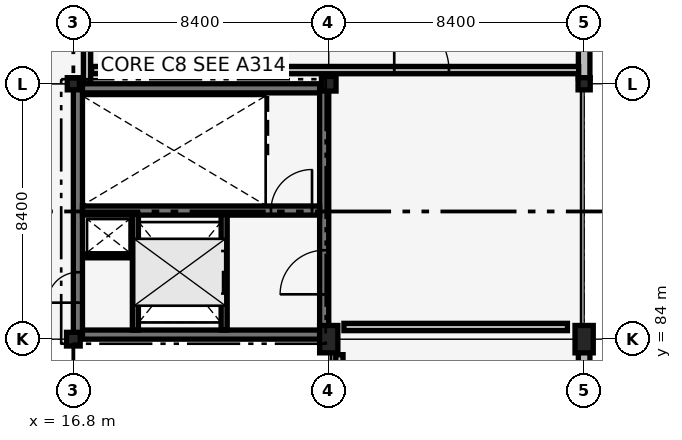
"""IFC4 building model, lengths in metres.
Left out: names, types, materials, properties, quantities, classifications, styles, units other than length and angle.
Written with IfcOpenShell. Run it as: python <this file> out.ifc"""

import sys

from ifc_helpers import new_model, si_unit, direction, frame, frame_2d, origin, origin_2d, place, context, subcontext, project, spatial, rectangle, extrude, element, fill, save


model = new_model("IFC4")
c1 = context("Model", 3, precision=1e-05, world=origin(), true_north=direction((0.0, 1.0)))
c2 = subcontext(c1, "Body", "Model", "MODEL_VIEW")
j1 = project(units=[si_unit("LENGTHUNIT", "METRE"), si_unit("PLANEANGLEUNIT", "RADIAN")], contexts=[c1])
p1 = place(None, origin())
s1 = spatial("IfcSite", under=j1, at=p1, CompositionType="ELEMENT")
p2 = place(p1, origin())
s2 = spatial("IfcBuilding", under=s1, at=p2, CompositionType="ELEMENT")
p3 = place(p2, frame((0.0, 0.0, 5.44)))
s3 = spatial("IfcBuildingStorey", under=s2, at=p3, CompositionType="ELEMENT", Elevation=5.44)
for number, where, z_axis, x_axis in (
    (1, (16.95, 84.15, 0.0), (0.0, 0.0, 1.0), (1.0, 0.0, 0.0)),
    (2, (16.95, 92.25, 0.0), (0.0, 0.0, 1.0), (1.0, 0.0, 0.0)),
):
    element("IfcWall", number, at=place(p3, frame(where, z_axis=z_axis, x_axis=x_axis)), inside=s3, PredefinedType="SHEAR", context=c2, shape_type="SweptSolid", body=[
        extrude(rectangle(XDim=8.1, YDim=0.3, at=frame_2d((4.05, 0.0))), origin(), (0.0, 0.0, 1.0), 4.12),
    ])
p4 = place(p3, frame((16.95, 84.15, 0.0), z_axis=(0.0, 0.0, 1.0), x_axis=(0.0, 1.0, 0.0)))
e3 = element("IfcWall", 3, at=p4, inside=s3, PredefinedType="SHEAR", context=c2, shape_type="SweptSolid", body=[
    extrude(rectangle(XDim=8.1, YDim=0.3, at=frame_2d((4.05, 0.0))), origin(), (0.0, 0.0, 1.0), 4.12),
])
p5 = place(p4, frame((1.05, 0.0, 0.0)))
e4 = element("IfcOpeningElement", 4, at=p5, cuts=e3, PredefinedType="OPENING", context=c2, shape_type="SweptSolid", body=[
    extrude(rectangle(XDim=1.0, YDim=2.15, at=frame_2d((0.5, 1.075))), frame((0.0, 0.16, 0.0), z_axis=(0.0, -1.0, 0.0), x_axis=(1.0, 0.0, 0.0)), (0.0, 0.0, 1.0), 0.32),
])
p6 = place(p3, frame((25.05, 84.15, 0.0), z_axis=(0.0, 0.0, 1.0), x_axis=(0.0, 1.0, 0.0)))
e5 = element("IfcWall", 5, at=p6, inside=s3, PredefinedType="SHEAR", context=c2, shape_type="SweptSolid", body=[
    extrude(rectangle(XDim=8.1, YDim=0.3, at=frame_2d((4.05, 0.0))), origin(), (0.0, 0.0, 1.0), 4.12),
])
p7 = place(p6, frame((1.325, 0.0, 0.0)))
e6 = element("IfcOpeningElement", 6, at=p7, cuts=e5, PredefinedType="OPENING", context=c2, shape_type="SweptSolid", body=[
    extrude(rectangle(XDim=1.45, YDim=2.15, at=frame_2d((0.725, 1.075))), frame((0.0, 0.16, 0.0), z_axis=(0.0, -1.0, 0.0), x_axis=(1.0, 0.0, 0.0)), (0.0, 0.0, 1.0), 0.32),
])
p8 = place(p3, frame((17.1, 88.23, 0.0), z_axis=(0.0, 0.0, 1.0), x_axis=(1.0, 0.0, 0.0)))
e7 = element("IfcWall", 7, at=p8, inside=s3, PredefinedType="SHEAR", context=c2, shape_type="SweptSolid", body=[
    extrude(rectangle(XDim=7.8, YDim=0.3, at=frame_2d((3.9, 0.0))), origin(), (0.0, 0.0, 1.0), 4.12),
])
p9 = place(p8, frame((6.2, 0.0, 0.0)))
e8 = element("IfcOpeningElement", 8, at=p9, cuts=e7, PredefinedType="OPENING", context=c2, shape_type="SweptSolid", body=[
    extrude(rectangle(XDim=1.35, YDim=2.15, at=frame_2d((0.675, 1.075))), frame((0.0, 0.16, 0.0), z_axis=(0.0, -1.0, 0.0), x_axis=(1.0, 0.0, 0.0)), (0.0, 0.0, 1.0), 0.32),
])
p10 = place(p3, frame((16.8, 84.0, 0.0), z_axis=(0.0, 0.0, 1.0), x_axis=(1.0, 0.0, 0.0)))
e9 = element("IfcColumn", 9, at=p10, inside=s3, PredefinedType="COLUMN", context=c2, shape_type="SweptSolid", body=[
    extrude(rectangle(XDim=0.45, YDim=0.45, at=origin_2d()), origin(), (0.0, 0.0, 1.0), 4.12),
])
p11 = place(p3, frame((16.8, 92.4, 0.0), z_axis=(0.0, 0.0, 1.0), x_axis=(1.0, 0.0, 0.0)))
e10 = element("IfcColumn", 10, at=p11, inside=s3, PredefinedType="COLUMN", context=c2, shape_type="SweptSolid", body=[
    extrude(rectangle(XDim=0.4, YDim=0.4, at=origin_2d()), origin(), (0.0, 0.0, 1.0), 4.12),
])
p12 = place(p3, frame((25.2, 84.0, 0.0), z_axis=(0.0, 0.0, 1.0), x_axis=(1.0, 0.0, 0.0)))
e11 = element("IfcColumn", 11, at=p12, inside=s3, PredefinedType="COLUMN", context=c2, shape_type="SweptSolid", body=[
    extrude(rectangle(XDim=0.6, YDim=0.9, at=origin_2d()), origin(), (0.0, 0.0, 1.0), 4.12),
])
p13 = place(p3, frame((25.2, 92.4, 0.0), z_axis=(0.0, 0.0, 1.0), x_axis=(1.0, 0.0, 0.0)))
e12 = element("IfcColumn", 12, at=p13, inside=s3, PredefinedType="COLUMN", context=c2, shape_type="SweptSolid", body=[
    extrude(rectangle(XDim=0.48, YDim=0.48, at=origin_2d()), origin(), (0.0, 0.0, 1.0), 4.12),
])
p14 = place(p3, frame((33.6, 84.0, 0.0), z_axis=(0.0, 0.0, 1.0), x_axis=(1.0, 0.0, 0.0)))
e13 = element("IfcColumn", 13, at=p14, inside=s3, PredefinedType="COLUMN", context=c2, shape_type="SweptSolid", body=[
    extrude(rectangle(XDim=0.6, YDim=0.9, at=origin_2d()), origin(), (0.0, 0.0, 1.0), 4.12),
])
p15 = place(p3, frame((33.6, 92.4, 0.0), z_axis=(0.0, 0.0, 1.0), x_axis=(1.0, 0.0, 0.0)))
e14 = element("IfcColumn", 14, at=p15, inside=s3, PredefinedType="COLUMN", context=c2, shape_type="SweptSolid", body=[
    extrude(rectangle(XDim=0.4, YDim=0.4, at=origin_2d()), origin(), (0.0, 0.0, 1.0), 4.12),
])
p16 = place(p3, frame((33.6, 76.035, 0.0), z_axis=(0.0, 0.0, 1.0), x_axis=(0.0, 1.0, 0.0)))
e15 = element("IfcWall", 15, at=p16, inside=s3, PredefinedType="SOLIDWALL", context=c2, shape_type="SweptSolid", body=[
    extrude(rectangle(XDim=7.53, YDim=0.38, at=frame_2d((3.765, 0.0))), origin(), (0.0, 0.0, 1.0), 4.02),
])
p17 = place(p3, frame((33.6, 92.585, 0.0), z_axis=(0.0, 0.0, 1.0), x_axis=(0.0, 1.0, 0.0)))
e16 = element("IfcWall", 16, at=p17, inside=s3, PredefinedType="SOLIDWALL", context=c2, shape_type="SweptSolid", body=[
    extrude(rectangle(XDim=8.005, YDim=0.38, at=frame_2d((4.002, 0.0))), origin(), (0.0, 0.0, 1.0), 4.12),
])
p18 = place(p17, frame((1.001, 0.0, 0.75)))
e17 = element("IfcOpeningElement", 17, at=p18, cuts=e16, PredefinedType="OPENING", context=c2, shape_type="SweptSolid", body=[
    extrude(rectangle(XDim=1.04, YDim=2.6, at=frame_2d((0.52, 1.3))), frame((0.0, 0.2, 0.0), z_axis=(0.0, -1.0, 0.0), x_axis=(1.0, 0.0, 0.0)), (0.0, 0.0, 1.0), 0.4),
])
p19 = place(p17, frame((2.602, 0.0, 0.75)))
e18 = element("IfcOpeningElement", 18, at=p19, cuts=e16, PredefinedType="OPENING", context=c2, shape_type="SweptSolid", body=[
    extrude(rectangle(XDim=1.04, YDim=2.6, at=frame_2d((0.52, 1.3))), frame((0.0, 0.2, 0.0), z_axis=(0.0, -1.0, 0.0), x_axis=(1.0, 0.0, 0.0)), (0.0, 0.0, 1.0), 0.4),
])
p20 = place(p17, frame((4.363, 0.0, 0.75)))
e19 = element("IfcOpeningElement", 19, at=p20, cuts=e16, PredefinedType="OPENING", context=c2, shape_type="SweptSolid", body=[
    extrude(rectangle(XDim=1.04, YDim=2.6, at=frame_2d((0.52, 1.3))), frame((0.0, 0.2, 0.0), z_axis=(0.0, -1.0, 0.0), x_axis=(1.0, 0.0, 0.0)), (0.0, 0.0, 1.0), 0.4),
])
p21 = place(p17, frame((5.964, 0.0, 0.75)))
e20 = element("IfcOpeningElement", 20, at=p21, cuts=e16, PredefinedType="OPENING", context=c2, shape_type="SweptSolid", body=[
    extrude(rectangle(XDim=1.04, YDim=2.6, at=frame_2d((0.52, 1.3))), frame((0.0, 0.2, 0.0), z_axis=(0.0, -1.0, 0.0), x_axis=(1.0, 0.0, 0.0)), (0.0, 0.0, 1.0), 0.4),
])
p22 = place(p3, frame((21.76, 84.3, 0.0), z_axis=(0.0, 0.0, 1.0), x_axis=(0.0, 1.0, 0.0)))
e21 = element("IfcWall", 21, at=p22, inside=s3, PredefinedType="SHEAR", context=c2, shape_type="SweptSolid", body=[
    extrude(rectangle(XDim=3.8, YDim=0.2, at=frame_2d((1.9, 0.0))), origin(), (0.0, 0.0, 1.0), 4.12),
])
p23 = place(p22, frame((1.2, 0.0, 0.0)))
e22 = element("IfcOpeningElement", 22, at=p23, cuts=e21, PredefinedType="OPENING", context=c2, shape_type="SweptSolid", body=[
    extrude(rectangle(XDim=1.4, YDim=2.2, at=frame_2d((0.7, 1.1))), frame((0.0, 0.11, 0.0), z_axis=(0.0, -1.0, 0.0), x_axis=(1.0, 0.0, 0.0)), (0.0, 0.0, 1.0), 0.22),
])
p24 = place(p3, frame((18.84, 84.3, 0.0), z_axis=(0.0, 0.0, 1.0), x_axis=(0.0, 1.0, 0.0)))
e23 = element("IfcWall", 23, at=p24, inside=s3, PredefinedType="SHEAR", context=c2, shape_type="SweptSolid", body=[
    extrude(rectangle(XDim=3.8, YDim=0.2, at=frame_2d((1.9, 0.0))), origin(), (0.0, 0.0, 1.0), 4.12),
])
p25 = place(p3, frame((17.12, 86.74, 0.0), z_axis=(0.0, 0.0, 1.0), x_axis=(1.0, 0.0, 0.0)))
e24 = element("IfcWall", 24, at=p25, inside=s3, PredefinedType="PARTITIONING", context=c2, shape_type="SweptSolid", body=[
    extrude(rectangle(XDim=1.62, YDim=0.13, at=frame_2d((0.81, 0.0))), origin(), (0.0, 0.0, 1.0), 4.12),
])
p26 = place(p3, frame((25.7, 84.4, 0.0), z_axis=(0.0, 0.0, 1.0), x_axis=(1.0, 0.0, 0.0)))
e25 = element("IfcWall", 25, at=p26, inside=s3, PredefinedType="PARTITIONING", context=c2, shape_type="SweptSolid", body=[
    extrude(rectangle(XDim=7.35, YDim=0.24, at=frame_2d((3.675, 0.0))), origin(), (0.0, 0.0, 1.0), 4.12),
])
p27 = place(p3, frame((25.55, 76.11, 0.0), z_axis=(0.0, 0.0, 1.0), x_axis=(0.0, 1.0, 0.0)))
e26 = element("IfcWall", 26, at=p27, inside=s3, PredefinedType="PARTITIONING", context=c2, shape_type="SweptSolid", body=[
    extrude(rectangle(XDim=7.38, YDim=0.24, at=frame_2d((3.69, 0.0))), origin(), (0.0, 0.0, 1.0), 4.12),
])
p28 = place(p3, frame((17.4, 92.85, 0.0), z_axis=(0.0, 0.0, 1.0), x_axis=(1.0, 0.0, 0.0)))
e27 = element("IfcWall", 27, at=p28, inside=s3, PredefinedType="PARTITIONING", context=c2, shape_type="SweptSolid", body=[
    extrude(rectangle(XDim=16.02, YDim=0.24, at=frame_2d((8.01, 0.0))), origin(), (0.0, 0.0, 1.0), 4.12),
])
p29 = place(p28, frame((9.954, 0.0, 0.0)))
e28 = element("IfcOpeningElement", 28, at=p29, cuts=e27, PredefinedType="OPENING", context=c2, shape_type="SweptSolid", body=[
    extrude(rectangle(XDim=1.8, YDim=2.4, at=frame_2d((0.9, 1.2))), frame((0.0, 0.13, 0.0), z_axis=(0.0, -1.0, 0.0), x_axis=(1.0, 0.0, 0.0)), (0.0, 0.0, 1.0), 0.26),
])
p30 = place(p3, frame((17.25, 92.43, 0.0), z_axis=(0.0, 0.0, 1.0), x_axis=(0.0, 1.0, 0.0)))
e29 = element("IfcWall", 29, at=p30, inside=s3, PredefinedType="PARTITIONING", context=c2, shape_type="SweptSolid", body=[
    extrude(rectangle(XDim=16.59, YDim=0.24, at=frame_2d((8.295, 0.0))), origin(), (0.0, 0.0, 1.0), 4.12),
])
p31 = place(p9, origin())
e30 = element("IfcDoor", 30, at=p31, inside=s3, OperationType="SINGLE_SWING_RIGHT", PredefinedType="DOOR", context=c2, shape_type="SweptSolid", body=[
    extrude(rectangle(XDim=1.35, YDim=2.15, at=frame_2d((0.675, 1.075))), frame((0.0, 0.025, 0.0), z_axis=(0.0, -1.0, 0.0), x_axis=(1.0, 0.0, 0.0)), (0.0, 0.0, 1.0), 0.05),
])
fill(e8, e30)
p32 = place(p23, origin())
e31 = element("IfcDoor", 31, at=p32, inside=s3, OperationType="SLIDING_TO_LEFT", PredefinedType="DOOR", context=c2, shape_type="SweptSolid", body=[
    extrude(rectangle(XDim=1.4, YDim=2.2, at=frame_2d((0.7, 1.1))), frame((0.0, 0.025, 0.0), z_axis=(0.0, -1.0, 0.0), x_axis=(1.0, 0.0, 0.0)), (0.0, 0.0, 1.0), 0.05),
])
fill(e22, e31)
p33 = place(p7, origin())
e32 = element("IfcDoor", 32, at=p33, inside=s3, OperationType="DOUBLE_DOOR_SINGLE_SWING", PredefinedType="DOOR", context=c2, shape_type="SweptSolid", body=[
    extrude(rectangle(XDim=1.45, YDim=2.15, at=frame_2d((0.725, 1.075))), frame((0.0, 0.025, 0.0), z_axis=(0.0, -1.0, 0.0), x_axis=(1.0, 0.0, 0.0)), (0.0, 0.0, 1.0), 0.05),
])
fill(e6, e32)
p34 = place(p5, origin())
e33 = element("IfcDoor", 33, at=p34, inside=s3, OperationType="SINGLE_SWING_LEFT", PredefinedType="DOOR", context=c2, shape_type="SweptSolid", body=[
    extrude(rectangle(XDim=1.0, YDim=2.15, at=frame_2d((0.5, 1.075))), frame((0.0, 0.025, 0.0), z_axis=(0.0, -1.0, 0.0), x_axis=(1.0, 0.0, 0.0)), (0.0, 0.0, 1.0), 0.05),
])
fill(e4, e33)
p35 = place(p29, origin())
e34 = element("IfcDoor", 34, at=p35, inside=s3, OperationType="DOUBLE_DOOR_SINGLE_SWING", PredefinedType="DOOR", context=c2, shape_type="SweptSolid", body=[
    extrude(rectangle(XDim=1.8, YDim=2.4, at=frame_2d((0.9, 1.2))), frame((0.0, 0.025, 0.0), z_axis=(0.0, -1.0, 0.0), x_axis=(1.0, 0.0, 0.0)), (0.0, 0.0, 1.0), 0.05),
])
fill(e28, e34)
save(model, sys.argv[1])
